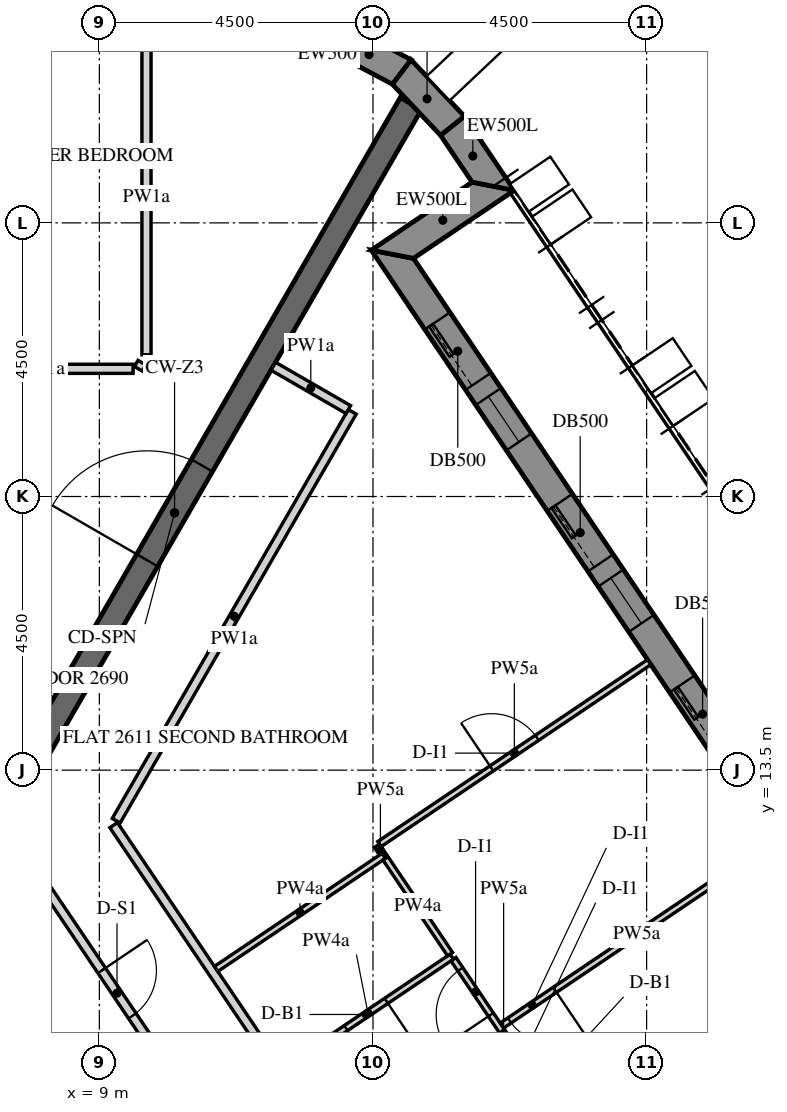
"""IFC4 building model, lengths in metres.
Left out: names, types, materials, properties, quantities, classifications, styles, units other than length and angle.
Written with IfcOpenShell. Run it as: python <this file> out.ifc"""

import sys

from ifc_helpers import new_model, si_unit, direction, frame, frame_2d, origin, place, context, subcontext, project, spatial, polyline, rectangle, outline, extrude, element, fill, save


model = new_model("IFC4")
c1 = context("Model", 3, precision=1e-05, world=origin(), true_north=direction((0.0, 1.0)))
c2 = subcontext(c1, "Body", "Model", "MODEL_VIEW")
j1 = project(units=[si_unit("LENGTHUNIT", "METRE"), si_unit("PLANEANGLEUNIT", "RADIAN")], contexts=[c1])
p1 = place(None, origin())
s1 = spatial("IfcSite", under=j1, at=p1, CompositionType="ELEMENT")
p2 = place(p1, origin())
s2 = spatial("IfcBuilding", under=s1, at=p2, CompositionType="ELEMENT")
p3 = place(p2, frame((0.0, 0.0, 326.4)))
s3 = spatial("IfcBuildingStorey", under=s2, at=p3, CompositionType="ELEMENT", Elevation=326.4)
p4 = place(p3, frame((26.706, 2.879, -0.15), z_axis=(0.0, 0.0, 1.0), x_axis=(-0.559197891507, 0.829034208061, 0.0)))
e1 = element("IfcWall", 1, at=p4, inside=s3, PredefinedType="SOLIDWALL", context=c2, shape_type="SweptSolid", body=[
    extrude(outline(polyline([(0.25, -0.25), (22.795, -0.25), (23.295, 0.25), (-0.25, 0.25), (0.25, -0.25)])), origin(), (0.0, 0.0, 1.0), 3.9),
])
p5 = place(p4, frame((1.323, 0.0, 1.05)))
e2 = element("IfcOpeningElement", 2, at=p5, cuts=e1, PredefinedType="OPENING", context=c2, shape_type="SweptSolid", body=[
    extrude(rectangle(XDim=0.9, YDim=1.5, at=frame_2d((0.45, 0.75))), frame((0.0, 0.26, 0.0), z_axis=(0.0, -1.0, 0.0), x_axis=(1.0, 0.0, 0.0)), (0.0, 0.0, 1.0), 0.52),
])
p6 = place(p4, frame((2.522, 0.0, 0.15)))
e3 = element("IfcOpeningElement", 3, at=p6, cuts=e1, PredefinedType="OPENING", context=c2, shape_type="SweptSolid", body=[
    extrude(rectangle(XDim=1.2, YDim=2.4, at=frame_2d((0.6, 1.2))), frame((0.0, 0.26, 0.0), z_axis=(0.0, -1.0, 0.0), x_axis=(1.0, 0.0, 0.0)), (0.0, 0.0, 1.0), 0.52),
])
p7 = place(p4, frame((4.922, 0.0, 1.05)))
e4 = element("IfcOpeningElement", 4, at=p7, cuts=e1, PredefinedType="OPENING", context=c2, shape_type="SweptSolid", body=[
    extrude(rectangle(XDim=0.9, YDim=1.5, at=frame_2d((0.45, 0.75))), frame((0.0, 0.26, 0.0), z_axis=(0.0, -1.0, 0.0), x_axis=(1.0, 0.0, 0.0)), (0.0, 0.0, 1.0), 0.52),
])
p8 = place(p4, frame((6.122, 0.0, 0.15)))
e5 = element("IfcOpeningElement", 5, at=p8, cuts=e1, PredefinedType="OPENING", context=c2, shape_type="SweptSolid", body=[
    extrude(rectangle(XDim=1.2, YDim=2.4, at=frame_2d((0.6, 1.2))), frame((0.0, 0.26, 0.0), z_axis=(0.0, -1.0, 0.0), x_axis=(1.0, 0.0, 0.0)), (0.0, 0.0, 1.0), 0.52),
])
p9 = place(p4, frame((8.522, 0.0, 1.05)))
e6 = element("IfcOpeningElement", 6, at=p9, cuts=e1, PredefinedType="OPENING", context=c2, shape_type="SweptSolid", body=[
    extrude(rectangle(XDim=0.9, YDim=1.5, at=frame_2d((0.45, 0.75))), frame((0.0, 0.26, 0.0), z_axis=(0.0, -1.0, 0.0), x_axis=(1.0, 0.0, 0.0)), (0.0, 0.0, 1.0), 0.52),
])
p10 = place(p4, frame((9.722, 0.0, 0.15)))
e7 = element("IfcOpeningElement", 7, at=p10, cuts=e1, PredefinedType="OPENING", context=c2, shape_type="SweptSolid", body=[
    extrude(rectangle(XDim=1.2, YDim=2.4, at=frame_2d((0.6, 1.2))), frame((0.0, 0.26, 0.0), z_axis=(0.0, -1.0, 0.0), x_axis=(1.0, 0.0, 0.0)), (0.0, 0.0, 1.0), 0.52),
])
p11 = place(p4, frame((12.122, 0.0, 1.05)))
e8 = element("IfcOpeningElement", 8, at=p11, cuts=e1, PredefinedType="OPENING", context=c2, shape_type="SweptSolid", body=[
    extrude(rectangle(XDim=0.9, YDim=1.5, at=frame_2d((0.45, 0.75))), frame((0.0, 0.26, 0.0), z_axis=(0.0, -1.0, 0.0), x_axis=(1.0, 0.0, 0.0)), (0.0, 0.0, 1.0), 0.52),
])
p12 = place(p4, frame((13.323, 0.0, 0.15)))
e9 = element("IfcOpeningElement", 9, at=p12, cuts=e1, PredefinedType="OPENING", context=c2, shape_type="SweptSolid", body=[
    extrude(rectangle(XDim=1.2, YDim=2.4, at=frame_2d((0.6, 1.2))), frame((0.0, 0.26, 0.0), z_axis=(0.0, -1.0, 0.0), x_axis=(1.0, 0.0, 0.0)), (0.0, 0.0, 1.0), 0.52),
])
p13 = place(p4, frame((15.722, 0.0, 1.05)))
e10 = element("IfcOpeningElement", 10, at=p13, cuts=e1, PredefinedType="OPENING", context=c2, shape_type="SweptSolid", body=[
    extrude(rectangle(XDim=0.9, YDim=1.5, at=frame_2d((0.45, 0.75))), frame((0.0, 0.26, 0.0), z_axis=(0.0, -1.0, 0.0), x_axis=(1.0, 0.0, 0.0)), (0.0, 0.0, 1.0), 0.52),
])
p14 = place(p4, frame((16.922, 0.0, 0.15)))
e11 = element("IfcOpeningElement", 11, at=p14, cuts=e1, PredefinedType="OPENING", context=c2, shape_type="SweptSolid", body=[
    extrude(rectangle(XDim=1.2, YDim=2.4, at=frame_2d((0.6, 1.2))), frame((0.0, 0.26, 0.0), z_axis=(0.0, -1.0, 0.0), x_axis=(1.0, 0.0, 0.0)), (0.0, 0.0, 1.0), 0.52),
])
p15 = place(p4, frame((19.323, 0.0, 1.05)))
e12 = element("IfcOpeningElement", 12, at=p15, cuts=e1, PredefinedType="OPENING", context=c2, shape_type="SweptSolid", body=[
    extrude(rectangle(XDim=0.9, YDim=1.5, at=frame_2d((0.45, 0.75))), frame((0.0, 0.26, 0.0), z_axis=(0.0, -1.0, 0.0), x_axis=(1.0, 0.0, 0.0)), (0.0, 0.0, 1.0), 0.52),
])
p16 = place(p4, frame((20.522, 0.0, 0.15)))
e13 = element("IfcOpeningElement", 13, at=p16, cuts=e1, PredefinedType="OPENING", context=c2, shape_type="SweptSolid", body=[
    extrude(rectangle(XDim=1.2, YDim=2.4, at=frame_2d((0.6, 1.2))), frame((0.0, 0.26, 0.0), z_axis=(0.0, -1.0, 0.0), x_axis=(1.0, 0.0, 0.0)), (0.0, 0.0, 1.0), 0.52),
])
p17 = place(p3, frame((13.819, 21.984, -0.15), z_axis=(0.0, 0.0, 1.0), x_axis=(0.829052389485, 0.559170935841, 0.0)))
e14 = element("IfcWall", 14, at=p17, inside=s3, PredefinedType="SOLIDWALL", context=c2, shape_type="SweptSolid", body=[
    extrude(outline(polyline([(0.25, -0.25), (2.25, -0.25), (1.75, 0.25), (-0.25, 0.25), (0.25, -0.25)])), origin(), (0.0, 0.0, 1.0), 3.9),
])
p18 = place(p3, frame((15.478, 23.102, -0.15), z_axis=(0.0, 0.0, 1.0), x_axis=(-0.559245726333, 0.829001940636, 0.0)))
e15 = element("IfcWall", 15, at=p18, inside=s3, PredefinedType="SOLIDWALL", context=c2, shape_type="SweptSolid", body=[
    extrude(outline(polyline([(-0.25, -0.25), (1.221, -0.25), (1.18, 0.25), (0.25, 0.25), (-0.25, -0.25)])), origin(), (0.0, 0.0, 1.0), 3.9),
])
p19 = place(p3, frame((14.806, 24.097, -0.15), z_axis=(0.0, 0.0, 1.0), x_axis=(-0.686234452793, 0.727380420275, 0.0)))
e16 = element("IfcWall", 16, at=p19, inside=s3, PredefinedType="SOLIDWALL", context=c2, shape_type="SweptSolid", body=[
    extrude(outline(polyline([(-0.021, -0.25), (1.257, -0.25), (1.175, 0.25), (0.021, 0.25), (-0.021, -0.25)])), origin(), (0.0, 0.0, 1.0), 3.9),
])
p20 = place(p3, frame((13.972, 24.982, -0.15), z_axis=(0.0, 0.0, 1.0), x_axis=(-0.882902492938, 0.469556373575, 0.0)))
e17 = element("IfcWall", 17, at=p20, inside=s3, PredefinedType="SOLIDWALL", context=c2, shape_type="SweptSolid", body=[
    extrude(outline(polyline([(-0.041, -0.25), (1.257, -0.25), (1.175, 0.25), (0.041, 0.25), (-0.041, -0.25)])), origin(), (0.0, 0.0, 1.0), 3.9),
])
p21 = place(p3, frame((12.471, 0.0, -0.15), z_axis=(0.0, 0.0, 1.0), x_axis=(-0.499996419489, 0.866027470984, 0.0)))
e18 = element("IfcWall", 18, at=p21, inside=s3, PredefinedType="SHEAR", context=c2, shape_type="SweptSolid", body=[
    extrude(outline(polyline([(-0.115, -0.2), (12.586, -0.2), (12.355, 0.2), (0.115, 0.2), (-0.115, -0.2)])), origin(), (0.0, 0.0, 1.0), 3.9),
])
p22 = place(p21, frame((5.306, 0.0, 0.15)))
e19 = element("IfcOpeningElement", 19, at=p22, cuts=e18, PredefinedType="OPENING", context=c2, shape_type="SweptSolid", body=[
    extrude(rectangle(XDim=1.8, YDim=2.4, at=frame_2d((0.9, 1.2))), frame((0.0, 0.21, 0.0), z_axis=(0.0, -1.0, 0.0), x_axis=(1.0, 0.0, 0.0)), (0.0, 0.0, 1.0), 0.42),
])
p23 = place(p3, frame((6.351, 11.0, -0.15), z_axis=(0.0, 0.0, 1.0), x_axis=(0.499998894578, 0.866026041999, 0.0)))
e20 = element("IfcWall", 20, at=p23, inside=s3, PredefinedType="SHEAR", context=c2, shape_type="SweptSolid", body=[
    extrude(rectangle(XDim=15.544, YDim=0.4, at=frame_2d((7.772, 0.0))), origin(), (0.0, 0.0, 1.0), 3.9),
])
p24 = place(p23, frame((6.872, 0.0, 0.15)))
e21 = element("IfcOpeningElement", 21, at=p24, cuts=e20, PredefinedType="OPENING", context=c2, shape_type="SweptSolid", body=[
    extrude(rectangle(XDim=1.8, YDim=2.4, at=frame_2d((0.9, 1.2))), frame((0.0, 0.21, 0.0), z_axis=(0.0, -1.0, 0.0), x_axis=(1.0, 0.0, 0.0)), (0.0, 0.0, 1.0), 0.42),
])
p25 = place(p3, frame((9.775, 25.5, 0.0), z_axis=(0.0, 0.0, 1.0), x_axis=(0.0, -1.0, 0.0)))
e22 = element("IfcWall", 22, at=p25, inside=s3, PredefinedType="PARTITIONING", context=c2, shape_type="SweptSolid", body=[
    extrude(rectangle(XDim=5.169, YDim=0.15, at=frame_2d((2.584, 0.0))), origin(), (0.0, 0.0, 1.0), 2.838),
])
p26 = place(p3, frame((9.7, 20.201, 0.0), z_axis=(0.0, 0.0, 1.0), x_axis=(-0.49996389635, -0.866046247233, 0.0)))
e23 = element("IfcWall", 23, at=p26, inside=s3, PredefinedType="PARTITIONING", context=c2, shape_type="SweptSolid", body=[
    extrude(rectangle(XDim=0.117, YDim=0.15, at=frame_2d((0.058, 0.0))), origin(), (0.0, 0.0, 1.0), 2.838),
])
p27 = place(p3, frame((9.555, 20.1, 0.0), z_axis=(0.0, 0.0, 1.0), x_axis=(-1.0, 0.0, 0.0)))
e24 = element("IfcWall", 24, at=p27, inside=s3, PredefinedType="PARTITIONING", context=c2, shape_type="SweptSolid", body=[
    extrude(rectangle(XDim=3.017, YDim=0.15, at=frame_2d((1.508, 0.0))), origin(), (0.0, 0.0, 1.0), 2.838),
])
p28 = place(p3, frame((18.521, -1.171, 0.0), z_axis=(0.0, 0.0, 1.0), x_axis=(-0.559191021435, 0.829038842001, 0.0)))
e25 = element("IfcWall", 25, at=p28, inside=s3, PredefinedType="PARTITIONING", context=c2, shape_type="SweptSolid", body=[
    extrude(rectangle(XDim=16.605, YDim=0.15, at=frame_2d((8.303, 0.0))), origin(), (0.0, 0.0, 1.0), 2.838),
])
p29 = place(p28, frame((9.703, 0.0, 0.0)))
e26 = element("IfcOpeningElement", 26, at=p29, cuts=e25, PredefinedType="OPENING", context=c2, shape_type="SweptSolid", body=[
    extrude(rectangle(XDim=1.0, YDim=2.1, at=frame_2d((0.5, 1.05))), frame((0.0, 0.085, 0.0), z_axis=(0.0, -1.0, 0.0), x_axis=(1.0, 0.0, 0.0)), (0.0, 0.0, 1.0), 0.17),
])
p30 = place(p3, frame((9.277, 12.668, 0.0), z_axis=(0.0, 0.0, 1.0), x_axis=(0.499991012162, 0.866030592853, 0.0)))
e27 = element("IfcWall", 27, at=p30, inside=s3, PredefinedType="PARTITIONING", context=c2, shape_type="SweptSolid", body=[
    extrude(rectangle(XDim=7.764, YDim=0.15, at=frame_2d((3.882, 0.0))), origin(), (0.0, 0.0, 1.0), 2.838),
])
p31 = place(p3, frame((13.094, 19.43, 0.0), z_axis=(0.0, 0.0, 1.0), x_axis=(-0.866062911188, 0.499935029643, 0.0)))
e28 = element("IfcWall", 28, at=p31, inside=s3, PredefinedType="PARTITIONING", context=c2, shape_type="SweptSolid", body=[
    extrude(rectangle(XDim=1.425, YDim=0.15, at=frame_2d((0.712, 0.0))), origin(), (0.0, 0.0, 1.0), 2.838),
])
p32 = place(p3, frame((7.694, 12.199, 0.0), z_axis=(0.0, 0.0, 1.0), x_axis=(0.55920112739, -0.829032025392, 0.0)))
e29 = element("IfcWall", 29, at=p32, inside=s3, PredefinedType="PARTITIONING", context=c2, shape_type="SweptSolid", body=[
    extrude(rectangle(XDim=5.71, YDim=0.15, at=frame_2d((2.855, 0.0))), origin(), (0.0, 0.0, 1.0), 2.838),
])
p33 = place(p32, frame((2.405, 0.0, 0.0)))
e30 = element("IfcOpeningElement", 30, at=p33, cuts=e29, PredefinedType="OPENING", context=c2, shape_type="SweptSolid", body=[
    extrude(rectangle(XDim=0.9, YDim=2.1, at=frame_2d((0.45, 1.05))), frame((0.0, 0.085, 0.0), z_axis=(0.0, -1.0, 0.0), x_axis=(1.0, 0.0, 0.0)), (0.0, 0.0, 1.0), 0.17),
])
p34 = place(p3, frame((22.069, 9.307, 0.0), z_axis=(0.0, 0.0, 1.0), x_axis=(-0.829040270775, -0.559188903174, 0.0)))
e31 = element("IfcWall", 31, at=p34, inside=s3, PredefinedType="PARTITIONING", context=c2, shape_type="SweptSolid", body=[
    extrude(rectangle(XDim=8.758, YDim=0.18, at=frame_2d((4.379, 0.0))), origin(), (0.0, 0.0, 1.0), 2.838),
])
p35 = place(p3, frame((13.678, 12.089, 0.0), z_axis=(0.0, 0.0, 1.0), x_axis=(-0.559431350648, 0.828876688001, 0.0)))
e32 = element("IfcWall", 32, at=p35, inside=s3, PredefinedType="PARTITIONING", context=c2, shape_type="SweptSolid", body=[
    extrude(rectangle(XDim=0.202, YDim=0.1, at=frame_2d((0.101, 0.0))), origin(), (0.0, 0.0, 1.0), 2.838),
])
p36 = place(p3, frame((13.607, 12.284, 0.0), z_axis=(0.0, 0.0, 1.0), x_axis=(0.829033261565, 0.559199294722, 0.0)))
e33 = element("IfcWall", 33, at=p36, inside=s3, PredefinedType="PARTITIONING", context=c2, shape_type="SweptSolid", body=[
    extrude(rectangle(XDim=5.35, YDim=0.1, at=frame_2d((2.675, 0.0))), origin(), (0.0, 0.0, 1.0), 2.838),
])
p37 = place(p36, frame((2.225, 0.0, 0.0)))
e34 = element("IfcOpeningElement", 34, at=p37, cuts=e33, PredefinedType="OPENING", context=c2, shape_type="SweptSolid", body=[
    extrude(rectangle(XDim=0.9, YDim=2.1, at=frame_2d((0.45, 1.05))), frame((0.0, 0.06, 0.0), z_axis=(0.0, -1.0, 0.0), x_axis=(1.0, 0.0, 0.0)), (0.0, 0.0, 1.0), 0.12),
])
p38 = place(p3, frame((10.921, 10.231, 0.0), z_axis=(0.0, 0.0, 1.0), x_axis=(0.829010378124, 0.559233218759, 0.0)))
e35 = element("IfcWall", 35, at=p38, inside=s3, PredefinedType="PARTITIONING", context=c2, shape_type="SweptSolid", body=[
    extrude(rectangle(XDim=3.325, YDim=0.1, at=frame_2d((1.663, 0.0))), origin(), (0.0, 0.0, 1.0), 2.838),
])
p39 = place(p3, frame((16.474, 7.944, 0.0), z_axis=(0.0, 0.0, 1.0), x_axis=(-0.559193191328, 0.829037378393, 0.0)))
e36 = element("IfcWall", 36, at=p39, inside=s3, PredefinedType="PARTITIONING", context=c2, shape_type="SweptSolid", body=[
    extrude(rectangle(XDim=2.954, YDim=0.1, at=frame_2d((1.477, 0.0))), origin(), (0.0, 0.0, 1.0), 2.838),
])
p40 = place(p39, frame((0.502, 0.0, 0.0)))
e37 = element("IfcOpeningElement", 37, at=p40, cuts=e36, PredefinedType="OPENING", context=c2, shape_type="SweptSolid", body=[
    extrude(rectangle(XDim=0.9, YDim=2.1, at=frame_2d((0.45, 1.05))), frame((0.0, 0.06, 0.0), z_axis=(0.0, -1.0, 0.0), x_axis=(1.0, 0.0, 0.0)), (0.0, 0.0, 1.0), 0.12),
])
p41 = place(p39, frame((1.852, 0.0, 0.0)))
e38 = element("IfcOpeningElement", 38, at=p41, cuts=e36, PredefinedType="OPENING", context=c2, shape_type="SweptSolid", body=[
    extrude(rectangle(XDim=0.9, YDim=2.1, at=frame_2d((0.45, 1.05))), frame((0.0, 0.06, 0.0), z_axis=(0.0, -1.0, 0.0), x_axis=(1.0, 0.0, 0.0)), (0.0, 0.0, 1.0), 0.12),
])
p42 = place(p3, frame((14.796, 10.433, 0.0), z_axis=(0.0, 0.0, 1.0), x_axis=(-0.82903334026, -0.559199178055, 0.0)))
e39 = element("IfcWall", 39, at=p42, inside=s3, PredefinedType="PARTITIONING", context=c2, shape_type="SweptSolid", body=[
    extrude(rectangle(XDim=3.325, YDim=0.1, at=frame_2d((1.663, 0.0))), origin(), (0.0, 0.0, 1.0), 2.838),
])
p43 = place(p42, frame((1.3, 0.0, 0.0)))
e40 = element("IfcOpeningElement", 40, at=p43, cuts=e39, PredefinedType="OPENING", context=c2, shape_type="SweptSolid", body=[
    extrude(rectangle(XDim=0.8, YDim=2.1, at=frame_2d((0.4, 1.05))), frame((0.0, 0.06, 0.0), z_axis=(0.0, -1.0, 0.0), x_axis=(1.0, 0.0, 0.0)), (0.0, 0.0, 1.0), 0.12),
])
p44 = place(p3, frame((20.055, 12.292, 0.0), z_axis=(0.0, 0.0, 1.0), x_axis=(-0.829033261565, -0.559199294722, 0.0)))
e41 = element("IfcWall", 41, at=p44, inside=s3, PredefinedType="PARTITIONING", context=c2, shape_type="SweptSolid", body=[
    extrude(rectangle(XDim=5.35, YDim=0.1, at=frame_2d((2.675, 0.0))), origin(), (0.0, 0.0, 1.0), 2.838),
])
p45 = place(p44, frame((4.3, 0.0, 0.0)))
e42 = element("IfcOpeningElement", 42, at=p45, cuts=e41, PredefinedType="OPENING", context=c2, shape_type="SweptSolid", body=[
    extrude(rectangle(XDim=0.9, YDim=2.1, at=frame_2d((0.45, 1.05))), frame((0.0, 0.06, 0.0), z_axis=(0.0, -1.0, 0.0), x_axis=(1.0, 0.0, 0.0)), (0.0, 0.0, 1.0), 0.12),
])
p46 = place(p3, frame((13.705, 12.049, 0.0), z_axis=(0.0, 0.0, 1.0), x_axis=(0.559199178055, -0.82903334026, 0.0)))
e43 = element("IfcWall", 43, at=p46, inside=s3, PredefinedType="PARTITIONING", context=c2, shape_type="SweptSolid", body=[
    extrude(rectangle(XDim=1.9, YDim=0.1, at=frame_2d((0.95, 0.0))), origin(), (0.0, 0.0, 1.0), 2.838),
])
p47 = place(p12, frame((0.0, 0.175, 0.0)))
e44 = element("IfcDoor", 44, at=p47, inside=s3, OperationType="SLIDING_TO_LEFT", PredefinedType="DOOR", context=c2, shape_type="SweptSolid", body=[
    extrude(rectangle(XDim=1.2, YDim=2.4, at=frame_2d((0.6, 1.2))), frame((0.0, 0.025, 0.0), z_axis=(0.0, -1.0, 0.0), x_axis=(1.0, 0.0, 0.0)), (0.0, 0.0, 1.0), 0.05),
])
fill(e9, e44)
p48 = place(p13, frame((0.0, 0.18, 0.0)))
e45 = element("IfcWindow", 45, at=p48, inside=s3, PartitioningType="SINGLE_PANEL", PredefinedType="WINDOW", context=c2, shape_type="SweptSolid", body=[
    extrude(rectangle(XDim=0.9, YDim=1.5, at=frame_2d((0.45, 0.75))), frame((0.0, 0.03, 0.0), z_axis=(0.0, -1.0, 0.0), x_axis=(1.0, 0.0, 0.0)), (0.0, 0.0, 1.0), 0.06),
])
fill(e10, e45)
p49 = place(p14, frame((0.0, 0.175, 0.0)))
e46 = element("IfcDoor", 46, at=p49, inside=s3, OperationType="SLIDING_TO_LEFT", PredefinedType="DOOR", context=c2, shape_type="SweptSolid", body=[
    extrude(rectangle(XDim=1.2, YDim=2.4, at=frame_2d((0.6, 1.2))), frame((0.0, 0.025, 0.0), z_axis=(0.0, -1.0, 0.0), x_axis=(1.0, 0.0, 0.0)), (0.0, 0.0, 1.0), 0.05),
])
fill(e11, e46)
p50 = place(p15, frame((0.0, 0.18, 0.0)))
e47 = element("IfcWindow", 47, at=p50, inside=s3, PartitioningType="SINGLE_PANEL", PredefinedType="WINDOW", context=c2, shape_type="SweptSolid", body=[
    extrude(rectangle(XDim=0.9, YDim=1.5, at=frame_2d((0.45, 0.75))), frame((0.0, 0.03, 0.0), z_axis=(0.0, -1.0, 0.0), x_axis=(1.0, 0.0, 0.0)), (0.0, 0.0, 1.0), 0.06),
])
fill(e12, e47)
p51 = place(p16, frame((0.0, 0.175, 0.0)))
e48 = element("IfcDoor", 48, at=p51, inside=s3, OperationType="SLIDING_TO_LEFT", PredefinedType="DOOR", context=c2, shape_type="SweptSolid", body=[
    extrude(rectangle(XDim=1.2, YDim=2.4, at=frame_2d((0.6, 1.2))), frame((0.0, 0.025, 0.0), z_axis=(0.0, -1.0, 0.0), x_axis=(1.0, 0.0, 0.0)), (0.0, 0.0, 1.0), 0.05),
])
fill(e13, e48)
p52 = place(p24, origin())
e49 = element("IfcDoor", 49, at=p52, inside=s3, OperationType="DOUBLE_DOOR_SINGLE_SWING", PredefinedType="DOOR", context=c2, shape_type="SweptSolid", body=[
    extrude(rectangle(XDim=1.8, YDim=2.4, at=frame_2d((0.9, 1.2))), frame((0.0, 0.025, 0.0), z_axis=(0.0, -1.0, 0.0), x_axis=(1.0, 0.0, 0.0)), (0.0, 0.0, 1.0), 0.05),
])
fill(e21, e49)
p53 = place(p45, origin())
e50 = element("IfcDoor", 50, at=p53, inside=s3, OperationType="SINGLE_SWING_RIGHT", PredefinedType="DOOR", context=c2, shape_type="SweptSolid", body=[
    extrude(rectangle(XDim=0.9, YDim=2.1, at=frame_2d((0.45, 1.05))), frame((0.0, 0.025, 0.0), z_axis=(0.0, -1.0, 0.0), x_axis=(1.0, 0.0, 0.0)), (0.0, 0.0, 1.0), 0.05),
])
fill(e42, e50)
p54 = place(p41, origin())
e51 = element("IfcDoor", 51, at=p54, inside=s3, OperationType="SINGLE_SWING_RIGHT", PredefinedType="DOOR", context=c2, shape_type="SweptSolid", body=[
    extrude(rectangle(XDim=0.9, YDim=2.1, at=frame_2d((0.45, 1.05))), frame((0.0, 0.025, 0.0), z_axis=(0.0, -1.0, 0.0), x_axis=(1.0, 0.0, 0.0)), (0.0, 0.0, 1.0), 0.05),
])
fill(e38, e51)
p55 = place(p43, origin())
e52 = element("IfcDoor", 52, at=p55, inside=s3, OperationType="SINGLE_SWING_LEFT", PredefinedType="DOOR", context=c2, shape_type="SweptSolid", body=[
    extrude(rectangle(XDim=0.8, YDim=2.1, at=frame_2d((0.4, 1.05))), frame((0.0, 0.025, 0.0), z_axis=(0.0, -1.0, 0.0), x_axis=(1.0, 0.0, 0.0)), (0.0, 0.0, 1.0), 0.05),
])
fill(e40, e52)
p56 = place(p37, origin())
e53 = element("IfcDoor", 53, at=p56, inside=s3, OperationType="SINGLE_SWING_RIGHT", PredefinedType="DOOR", context=c2, shape_type="SweptSolid", body=[
    extrude(rectangle(XDim=0.9, YDim=2.1, at=frame_2d((0.45, 1.05))), frame((0.0, 0.025, 0.0), z_axis=(0.0, -1.0, 0.0), x_axis=(1.0, 0.0, 0.0)), (0.0, 0.0, 1.0), 0.05),
])
fill(e34, e53)
p57 = place(p33, origin())
e54 = element("IfcDoor", 54, at=p57, inside=s3, OperationType="SINGLE_SWING_RIGHT", PredefinedType="DOOR", context=c2, shape_type="SweptSolid", body=[
    extrude(rectangle(XDim=0.9, YDim=2.1, at=frame_2d((0.45, 1.05))), frame((0.0, 0.025, 0.0), z_axis=(0.0, -1.0, 0.0), x_axis=(1.0, 0.0, 0.0)), (0.0, 0.0, 1.0), 0.05),
])
fill(e30, e54)
save(model, sys.argv[1])
